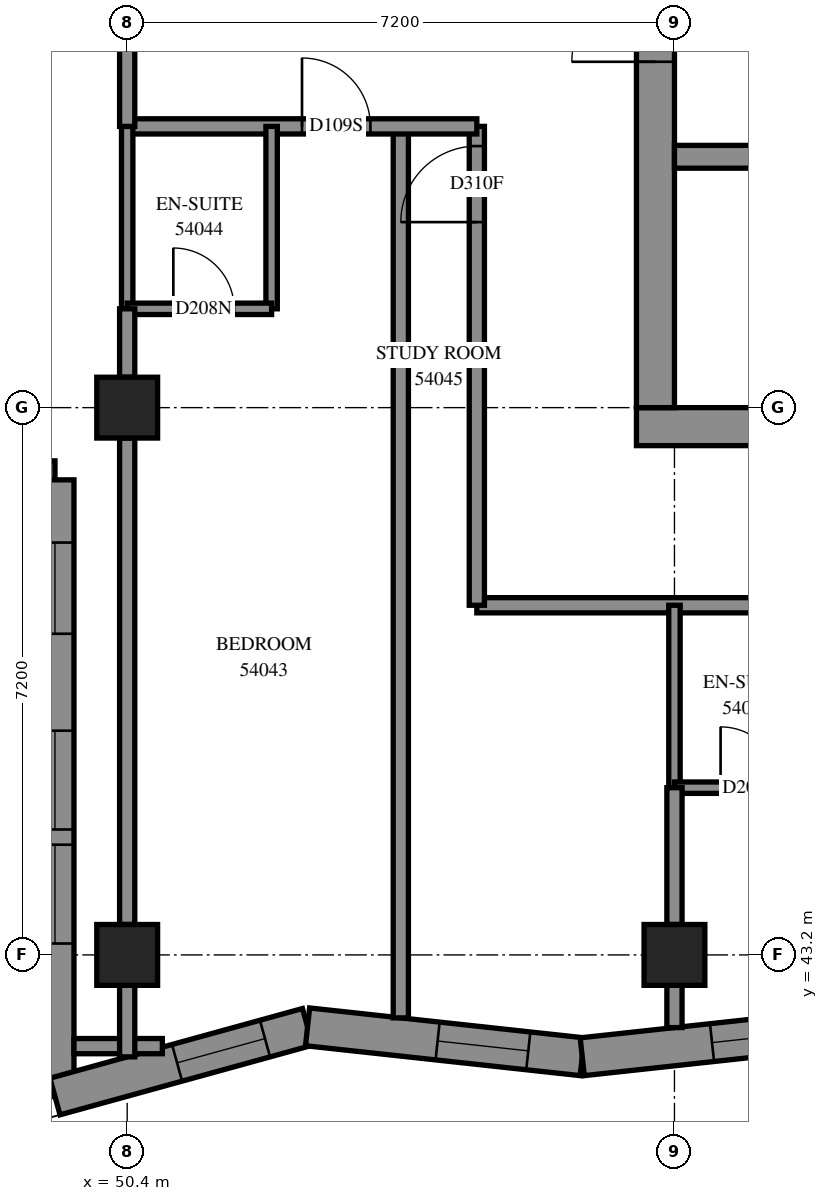
"""IFC4 building model, lengths in metres.
Left out: names, types, materials, properties, quantities, classifications, styles, units other than length and angle.
Written with IfcOpenShell. Run it as: python <this file> out.ifc"""

import sys

from ifc_helpers import new_model, si_unit, direction, frame, frame_2d, origin, origin_2d, place, context, subcontext, project, spatial, polyline, rectangle, outline, extrude, element, fill, save


model = new_model("IFC4")
c1 = context("Model", 3, precision=1e-05, world=origin(), true_north=direction((0.0, 1.0)))
c2 = subcontext(c1, "Body", "Model", "MODEL_VIEW")
j1 = project(units=[si_unit("LENGTHUNIT", "METRE"), si_unit("PLANEANGLEUNIT", "RADIAN")], contexts=[c1])
p1 = place(None, origin())
s1 = spatial("IfcSite", under=j1, at=p1, CompositionType="ELEMENT")
p2 = place(p1, origin())
s2 = spatial("IfcBuilding", under=s1, at=p2, CompositionType="ELEMENT")
p3 = place(p2, frame((0.0, 0.0, 199.8)))
s3 = spatial("IfcBuildingStorey", under=s2, at=p3, CompositionType="ELEMENT", Elevation=199.8)
for number, where, z_axis, x_axis in (
    (1, (50.4, 43.2, 0.0), (0.0, 0.0, 1.0), (1.0, 0.0, 0.0)),
    (2, (50.4, 50.4, 0.0), (0.0, 0.0, 1.0), (1.0, 0.0, 0.0)),
    (3, (57.6, 43.2, 0.0), (0.0, 0.0, 1.0), (1.0, 0.0, 0.0)),
):
    element("IfcColumn", number, at=place(p3, frame(where, z_axis=z_axis, x_axis=x_axis)), inside=s3, PredefinedType="COLUMN", context=c2, shape_type="SweptSolid", body=[
        extrude(rectangle(XDim=0.8, YDim=0.8, at=origin_2d()), origin(), (0.0, 0.0, 1.0), 3.1),
    ])
p4 = place(p3, frame((57.1, 50.15, -0.3), z_axis=(0.0, 0.0, 1.0), x_axis=(1.0, 0.0, 0.0)))
e4 = element("IfcWall", 4, at=p4, inside=s3, PredefinedType="SHEAR", context=c2, shape_type="SweptSolid", body=[
    extrude(rectangle(XDim=15.4, YDim=0.5, at=frame_2d((7.7, 0.0))), origin(), (0.0, 0.0, 1.0), 2.7),
])
p5 = place(p3, frame((57.35, 50.4, -0.3), z_axis=(0.0, 0.0, 1.0), x_axis=(0.0, 1.0, 0.0)))
e5 = element("IfcWall", 5, at=p5, inside=s3, PredefinedType="SHEAR", context=c2, shape_type="SweptSolid", body=[
    extrude(rectangle(XDim=14.4, YDim=0.5, at=frame_2d((7.2, 0.0))), origin(), (0.0, 0.0, 1.0), 2.7),
])
p6 = place(p5, frame((4.55, 0.0, 0.3)))
e6 = element("IfcOpeningElement", 6, at=p6, cuts=e5, PredefinedType="OPENING", context=c2, shape_type="SweptSolid", body=[
    extrude(rectangle(XDim=1.1, YDim=2.1, at=frame_2d((0.55, 1.05))), frame((0.0, 0.26, 0.0), z_axis=(0.0, -1.0, 0.0), x_axis=(1.0, 0.0, 0.0)), (0.0, 0.0, 1.0), 0.52),
])
p7 = place(p5, frame((11.35, 0.0, 0.3)))
e7 = element("IfcOpeningElement", 7, at=p7, cuts=e5, PredefinedType="OPENING", context=c2, shape_type="SweptSolid", body=[
    extrude(rectangle(XDim=1.1, YDim=2.1, at=frame_2d((0.55, 1.05))), frame((0.0, 0.26, 0.0), z_axis=(0.0, -1.0, 0.0), x_axis=(1.0, 0.0, 0.0)), (0.0, 0.0, 1.0), 0.52),
])
p8 = place(p3, frame((57.6, 53.7, 0.0), z_axis=(0.0, 0.0, 1.0), x_axis=(1.0, 0.0, 0.0)))
e8 = element("IfcWall", 8, at=p8, inside=s3, PredefinedType="SOLIDWALL", context=c2, shape_type="SweptSolid", body=[
    extrude(rectangle(XDim=14.4, YDim=0.3, at=frame_2d((7.2, 0.0))), origin(), (0.0, 0.0, 1.0), 3.1),
])
p9 = place(p8, frame((1.35, 0.0, 0.0)))
e9 = element("IfcOpeningElement", 9, at=p9, cuts=e8, PredefinedType="OPENING", context=c2, shape_type="SweptSolid", body=[
    extrude(rectangle(XDim=0.9, YDim=2.1, at=frame_2d((0.45, 1.05))), frame((0.0, 0.16, 0.0), z_axis=(0.0, -1.0, 0.0), x_axis=(1.0, 0.0, 0.0)), (0.0, 0.0, 1.0), 0.32),
])
p10 = place(p8, frame((4.95, 0.0, 0.0)))
e10 = element("IfcOpeningElement", 10, at=p10, cuts=e8, PredefinedType="OPENING", context=c2, shape_type="SweptSolid", body=[
    extrude(rectangle(XDim=0.9, YDim=2.1, at=frame_2d((0.45, 1.05))), frame((0.0, 0.16, 0.0), z_axis=(0.0, -1.0, 0.0), x_axis=(1.0, 0.0, 0.0)), (0.0, 0.0, 1.0), 0.32),
])
p11 = place(p8, frame((8.55, 0.0, 0.0)))
e11 = element("IfcOpeningElement", 11, at=p11, cuts=e8, PredefinedType="OPENING", context=c2, shape_type="SweptSolid", body=[
    extrude(rectangle(XDim=0.9, YDim=2.1, at=frame_2d((0.45, 1.05))), frame((0.0, 0.16, 0.0), z_axis=(0.0, -1.0, 0.0), x_axis=(1.0, 0.0, 0.0)), (0.0, 0.0, 1.0), 0.32),
])
p12 = place(p8, frame((12.05, 0.0, 0.0)))
e12 = element("IfcOpeningElement", 12, at=p12, cuts=e8, PredefinedType="OPENING", context=c2, shape_type="SweptSolid", body=[
    extrude(rectangle(XDim=1.1, YDim=2.1, at=frame_2d((0.55, 1.05))), frame((0.0, 0.16, 0.0), z_axis=(0.0, -1.0, 0.0), x_axis=(1.0, 0.0, 0.0)), (0.0, 0.0, 1.0), 0.32),
])
p13 = place(p3, frame((42.25, 49.45, 0.0), z_axis=(0.0, 0.0, 1.0), x_axis=(1.0, 0.0, 0.0)))
e13 = element("IfcWall", 13, at=p13, inside=s3, PredefinedType="SOLIDWALL", context=c2, shape_type="SweptSolid", body=[
    extrude(outline(polyline([(-0.25, -0.25), (6.95, -0.25), (7.45, 0.25), (0.25, 0.25), (-0.25, -0.25)])), origin(), (0.0, 0.0, 1.0), 3.1),
])
p14 = place(p13, frame((1.35, 0.0, 0.45)))
e14 = element("IfcOpeningElement", 14, at=p14, cuts=e13, PredefinedType="OPENING", context=c2, shape_type="SweptSolid", body=[
    extrude(rectangle(XDim=1.3, YDim=2.5, at=frame_2d((0.65, 1.25))), frame((0.0, 0.26, 0.0), z_axis=(0.0, -1.0, 0.0), x_axis=(1.0, 0.0, 0.0)), (0.0, 0.0, 1.0), 0.52),
])
p15 = place(p13, frame((2.85, 0.0, 0.45)))
e15 = element("IfcOpeningElement", 15, at=p15, cuts=e13, PredefinedType="OPENING", context=c2, shape_type="SweptSolid", body=[
    extrude(rectangle(XDim=1.3, YDim=2.5, at=frame_2d((0.65, 1.25))), frame((0.0, 0.26, 0.0), z_axis=(0.0, -1.0, 0.0), x_axis=(1.0, 0.0, 0.0)), (0.0, 0.0, 1.0), 0.52),
])
p16 = place(p13, frame((5.175, 0.0, 0.45)))
e16 = element("IfcOpeningElement", 16, at=p16, cuts=e13, PredefinedType="OPENING", context=c2, shape_type="SweptSolid", body=[
    extrude(rectangle(XDim=1.2, YDim=2.5, at=frame_2d((0.6, 1.25))), frame((0.0, 0.26, 0.0), z_axis=(0.0, -1.0, 0.0), x_axis=(1.0, 0.0, 0.0)), (0.0, 0.0, 1.0), 0.52),
])
p17 = place(p3, frame((49.45, 49.45, 0.0), z_axis=(0.0, 0.0, 1.0), x_axis=(0.0, -1.0, 0.0)))
e17 = element("IfcWall", 17, at=p17, inside=s3, PredefinedType="SOLIDWALL", context=c2, shape_type="SweptSolid", body=[
    extrude(outline(polyline([(0.25, -0.25), (8.441, -0.25), (7.784, 0.25), (-0.25, 0.25), (0.25, -0.25)])), origin(), (0.0, 0.0, 1.0), 3.1),
])
p18 = place(p17, frame((3.3, 0.0, 0.45)))
e18 = element("IfcOpeningElement", 18, at=p18, cuts=e17, PredefinedType="OPENING", context=c2, shape_type="SweptSolid", body=[
    extrude(rectangle(XDim=1.3, YDim=2.5, at=frame_2d((0.65, 1.25))), frame((0.0, 0.26, 0.0), z_axis=(0.0, -1.0, 0.0), x_axis=(1.0, 0.0, 0.0)), (0.0, 0.0, 1.0), 0.52),
])
p19 = place(p17, frame((4.8, 0.0, 0.45)))
e19 = element("IfcOpeningElement", 19, at=p19, cuts=e17, PredefinedType="OPENING", context=c2, shape_type="SweptSolid", body=[
    extrude(rectangle(XDim=1.3, YDim=2.5, at=frame_2d((0.65, 1.25))), frame((0.0, 0.26, 0.0), z_axis=(0.0, -1.0, 0.0), x_axis=(1.0, 0.0, 0.0)), (0.0, 0.0, 1.0), 0.52),
])
p20 = place(p17, frame((0.825, 0.0, 0.45)))
e20 = element("IfcOpeningElement", 20, at=p20, cuts=e17, PredefinedType="OPENING", context=c2, shape_type="SweptSolid", body=[
    extrude(rectangle(XDim=1.2, YDim=2.5, at=frame_2d((0.6, 1.25))), frame((0.0, 0.26, 0.0), z_axis=(0.0, -1.0, 0.0), x_axis=(1.0, 0.0, 0.0)), (0.0, 0.0, 1.0), 0.52),
])
p21 = place(p3, frame((49.45, 41.337, 0.0), z_axis=(0.0, 0.0, 1.0), x_axis=(0.964012106, 0.2658583448, 0.0)))
e21 = element("IfcWall", 21, at=p21, inside=s3, PredefinedType="SOLIDWALL", context=c2, shape_type="SweptSolid", body=[
    extrude(outline(polyline([(-0.328, -0.25), (3.399, -0.25), (3.495, 0.25), (0.328, 0.25), (-0.328, -0.25)])), origin(), (0.0, 0.0, 1.0), 3.1),
])
p22 = place(p21, frame((1.666, 0.0, 0.45)))
e22 = element("IfcOpeningElement", 22, at=p22, cuts=e21, PredefinedType="OPENING", context=c2, shape_type="SweptSolid", body=[
    extrude(rectangle(XDim=1.2, YDim=2.5, at=frame_2d((0.6, 1.25))), frame((0.0, 0.26, 0.0), z_axis=(0.0, -1.0, 0.0), x_axis=(1.0, 0.0, 0.0)), (0.0, 0.0, 1.0), 0.52),
])
p23 = place(p3, frame((52.773, 42.254, 0.0), z_axis=(0.0, 0.0, 1.0), x_axis=(0.9941327648, -0.1081667505, 0.0)))
e23 = element("IfcWall", 23, at=p23, inside=s3, PredefinedType="SOLIDWALL", context=c2, shape_type="SweptSolid", body=[
    extrude(outline(polyline([(0.048, -0.25), (3.662, -0.25), (3.608, 0.25), (-0.048, 0.25), (0.048, -0.25)])), origin(), (0.0, 0.0, 1.0), 3.1),
])
p24 = place(p23, frame((1.721, 0.0, 0.45)))
e24 = element("IfcOpeningElement", 24, at=p24, cuts=e23, PredefinedType="OPENING", context=c2, shape_type="SweptSolid", body=[
    extrude(rectangle(XDim=1.2, YDim=2.5, at=frame_2d((0.6, 1.25))), frame((0.0, 0.26, 0.0), z_axis=(0.0, -1.0, 0.0), x_axis=(1.0, 0.0, 0.0)), (0.0, 0.0, 1.0), 0.52),
])
p25 = place(p3, frame((56.387, 41.861, 0.0), z_axis=(0.0, 0.0, 1.0), x_axis=(0.994132181, 0.1081721163, 0.0)))
e25 = element("IfcWall", 25, at=p25, inside=s3, PredefinedType="SOLIDWALL", context=c2, shape_type="SweptSolid", body=[
    extrude(outline(polyline([(-0.027, -0.25), (3.587, -0.25), (3.642, 0.25), (0.027, 0.25), (-0.027, -0.25)])), origin(), (0.0, 0.0, 1.0), 3.1),
])
p26 = place(p25, frame((1.718, 0.0, 0.45)))
e26 = element("IfcOpeningElement", 26, at=p26, cuts=e25, PredefinedType="OPENING", context=c2, shape_type="SweptSolid", body=[
    extrude(rectangle(XDim=1.2, YDim=2.5, at=frame_2d((0.6, 1.25))), frame((0.0, 0.26, 0.0), z_axis=(0.0, -1.0, 0.0), x_axis=(1.0, 0.0, 0.0)), (0.0, 0.0, 1.0), 0.52),
])
p27 = place(p3, frame((55.0, 47.8, 0.0), z_axis=(0.0, 0.0, 1.0), x_axis=(1.0, 0.0, 0.0)))
e27 = element("IfcWall", 27, at=p27, inside=s3, PredefinedType="PARTITIONING", context=c2, shape_type="SweptSolid", body=[
    extrude(rectangle(XDim=19.266, YDim=0.2, at=frame_2d((9.633, 0.0))), origin(), (0.0, 0.0, 1.0), 3.1),
])
p28 = place(p27, frame((4.9, 0.0, 0.0)))
e28 = element("IfcOpeningElement", 28, at=p28, cuts=e27, PredefinedType="OPENING", context=c2, shape_type="SweptSolid", body=[
    extrude(rectangle(XDim=0.9, YDim=2.1, at=frame_2d((0.45, 1.05))), frame((0.0, 0.11, 0.0), z_axis=(0.0, -1.0, 0.0), x_axis=(1.0, 0.0, 0.0)), (0.0, 0.0, 1.0), 0.22),
])
p29 = place(p27, frame((6.6, 0.0, 0.0)))
e29 = element("IfcOpeningElement", 29, at=p29, cuts=e27, PredefinedType="OPENING", context=c2, shape_type="SweptSolid", body=[
    extrude(rectangle(XDim=0.9, YDim=2.1, at=frame_2d((0.45, 1.05))), frame((0.0, 0.11, 0.0), z_axis=(0.0, -1.0, 0.0), x_axis=(1.0, 0.0, 0.0)), (0.0, 0.0, 1.0), 0.22),
])
p30 = place(p27, frame((13.743, 0.0, 0.0)))
e30 = element("IfcOpeningElement", 30, at=p30, cuts=e27, PredefinedType="OPENING", context=c2, shape_type="SweptSolid", body=[
    extrude(rectangle(XDim=0.9, YDim=2.1, at=frame_2d((0.45, 1.05))), frame((0.0, 0.11, 0.0), z_axis=(0.0, -1.0, 0.0), x_axis=(1.0, 0.0, 0.0)), (0.0, 0.0, 1.0), 0.22),
])
p31 = place(p3, frame((54.0, 42.372, 0.0), z_axis=(0.0, 0.0, 1.0), x_axis=(0.0, 1.0, 0.0)))
e31 = element("IfcWall", 31, at=p31, inside=s3, PredefinedType="PARTITIONING", context=c2, shape_type="SweptSolid", body=[
    extrude(rectangle(XDim=11.728, YDim=0.2, at=frame_2d((5.864, 0.0))), origin(), (0.0, 0.0, 1.0), 3.1),
])
p32 = place(p3, frame((50.4, 43.6, 0.0), z_axis=(0.0, 0.0, 1.0), x_axis=(0.0, 1.0, 0.0)))
e32 = element("IfcWall", 32, at=p32, inside=s3, PredefinedType="PARTITIONING", context=c2, shape_type="SweptSolid", body=[
    extrude(rectangle(XDim=6.4, YDim=0.2, at=frame_2d((3.2, 0.0))), origin(), (0.0, 0.0, 1.0), 2.6),
])
p33 = place(p3, frame((55.0, 47.8, 0.0), z_axis=(0.0, 0.0, 1.0), x_axis=(0.0, 1.0, 0.0)))
e33 = element("IfcWall", 33, at=p33, inside=s3, PredefinedType="PARTITIONING", context=c2, shape_type="SweptSolid", body=[
    extrude(rectangle(XDim=6.3, YDim=0.2, at=frame_2d((3.15, 0.0))), origin(), (0.0, 0.0, 1.0), 3.1),
])
p34 = place(p33, frame((5.041, 0.0, 0.0)))
e34 = element("IfcOpeningElement", 34, at=p34, cuts=e33, PredefinedType="OPENING", context=c2, shape_type="SweptSolid", body=[
    extrude(rectangle(XDim=1.0, YDim=2.1, at=frame_2d((0.5, 1.05))), frame((0.0, 0.11, 0.0), z_axis=(0.0, -1.0, 0.0), x_axis=(1.0, 0.0, 0.0)), (0.0, 0.0, 1.0), 0.22),
])
p35 = place(p3, frame((50.4, 54.1, 0.0), z_axis=(0.0, 0.0, 1.0), x_axis=(1.0, 0.0, 0.0)))
e35 = element("IfcWall", 35, at=p35, inside=s3, PredefinedType="PARTITIONING", context=c2, shape_type="SweptSolid", body=[
    extrude(rectangle(XDim=4.6, YDim=0.2, at=frame_2d((2.3, 0.0))), origin(), (0.0, 0.0, 1.0), 3.1),
])
p36 = place(p35, frame((2.3, 0.0, 0.0)))
e36 = element("IfcOpeningElement", 36, at=p36, cuts=e35, PredefinedType="OPENING", context=c2, shape_type="SweptSolid", body=[
    extrude(rectangle(XDim=0.9, YDim=2.1, at=frame_2d((0.45, 1.05))), frame((0.0, 0.11, 0.0), z_axis=(0.0, -1.0, 0.0), x_axis=(1.0, 0.0, 0.0)), (0.0, 0.0, 1.0), 0.22),
])
for number, where, z_axis, x_axis in (
    (37, (52.3, 51.7, 0.0), (0.0, 0.0, 1.0), (0.0, 1.0, 0.0)),
    (38, (50.4, 51.7, 0.0), (0.0, 0.0, 1.0), (0.0, 1.0, 0.0)),
    (39, (57.6, 45.4, 0.0), (0.0, 0.0, 1.0), (0.0, 1.0, 0.0)),
):
    element("IfcWall", number, at=place(p3, frame(where, z_axis=z_axis, x_axis=x_axis)), inside=s3, PredefinedType="PARTITIONING", context=c2, shape_type="SweptSolid", body=[
        extrude(rectangle(XDim=2.4, YDim=0.15, at=frame_2d((1.2, 0.0))), origin(), (0.0, 0.0, 1.0), 3.1),
    ])
p37 = place(p3, frame((50.4, 54.1, 0.0), z_axis=(0.0, 0.0, 1.0), x_axis=(0.0, 1.0, 0.0)))
e40 = element("IfcWall", 40, at=p37, inside=s3, PredefinedType="PARTITIONING", context=c2, shape_type="SweptSolid", body=[
    extrude(rectangle(XDim=2.2, YDim=0.2, at=frame_2d((1.1, 0.0))), origin(), (0.0, 0.0, 1.0), 3.1),
])
p38 = place(p3, frame((50.4, 51.7, 0.0), z_axis=(0.0, 0.0, 1.0), x_axis=(1.0, 0.0, 0.0)))
e41 = element("IfcWall", 41, at=p38, inside=s3, PredefinedType="PARTITIONING", context=c2, shape_type="SweptSolid", body=[
    extrude(rectangle(XDim=1.9, YDim=0.15, at=frame_2d((0.95, 0.0))), origin(), (0.0, 0.0, 1.0), 3.1),
])
p39 = place(p38, frame((0.607, 0.0, 0.0)))
e42 = element("IfcOpeningElement", 42, at=p39, cuts=e41, PredefinedType="OPENING", context=c2, shape_type="SweptSolid", body=[
    extrude(rectangle(XDim=0.8, YDim=2.1, at=frame_2d((0.4, 1.05))), frame((0.0, 0.085, 0.0), z_axis=(0.0, -1.0, 0.0), x_axis=(1.0, 0.0, 0.0)), (0.0, 0.0, 1.0), 0.17),
])
p40 = place(p3, frame((57.6, 45.4, 0.0), z_axis=(0.0, 0.0, 1.0), x_axis=(1.0, 0.0, 0.0)))
e43 = element("IfcWall", 43, at=p40, inside=s3, PredefinedType="PARTITIONING", context=c2, shape_type="SweptSolid", body=[
    extrude(rectangle(XDim=1.9, YDim=0.15, at=frame_2d((0.95, 0.0))), origin(), (0.0, 0.0, 1.0), 3.1),
])
p41 = place(p40, frame((0.607, 0.0, 0.0)))
e44 = element("IfcOpeningElement", 44, at=p41, cuts=e43, PredefinedType="OPENING", context=c2, shape_type="SweptSolid", body=[
    extrude(rectangle(XDim=0.8, YDim=2.1, at=frame_2d((0.4, 1.05))), frame((0.0, 0.085, 0.0), z_axis=(0.0, -1.0, 0.0), x_axis=(1.0, 0.0, 0.0)), (0.0, 0.0, 1.0), 0.17),
])
p42 = place(p3, frame((57.6, 43.6, 0.0), z_axis=(0.0, 0.0, 1.0), x_axis=(0.0, 1.0, 0.0)))
e45 = element("IfcWall", 45, at=p42, inside=s3, PredefinedType="PARTITIONING", context=c2, shape_type="SweptSolid", body=[
    extrude(rectangle(XDim=1.8, YDim=0.2, at=frame_2d((0.9, 0.0))), origin(), (0.0, 0.0, 1.0), 3.1),
])
p43 = place(p3, frame((49.7, 42.0, 0.0), z_axis=(0.0, 0.0, 1.0), x_axis=(1.0, 0.0, 0.0)))
e46 = element("IfcWall", 46, at=p43, inside=s3, PredefinedType="PARTITIONING", context=c2, shape_type="SweptSolid", body=[
    extrude(rectangle(XDim=1.163, YDim=0.2, at=frame_2d((0.581, 0.0))), origin(), (0.0, 0.0, 1.0), 3.1),
])
p44 = place(p3, frame((50.4, 50.8, 0.0), z_axis=(0.0, 0.0, 1.0), x_axis=(0.0, 1.0, 0.0)))
e47 = element("IfcWall", 47, at=p44, inside=s3, PredefinedType="PARTITIONING", context=c2, shape_type="SweptSolid", body=[
    extrude(rectangle(XDim=0.9, YDim=0.2, at=frame_2d((0.45, 0.0))), origin(), (0.0, 0.0, 1.0), 3.1),
])
p45 = place(p3, frame((50.4, 41.859, 0.0), z_axis=(0.0, 0.0, 1.0), x_axis=(0.0, 1.0, 0.0)))
e48 = element("IfcWall", 48, at=p45, inside=s3, PredefinedType="PARTITIONING", context=c2, shape_type="SweptSolid", body=[
    extrude(rectangle(XDim=0.941, YDim=0.2, at=frame_2d((0.471, 0.0))), origin(), (0.0, 0.0, 1.0), 3.1),
])
p46 = place(p3, frame((57.6, 42.244, 0.0), z_axis=(0.0, 0.0, 1.0), x_axis=(0.0, 1.0, 0.0)))
e49 = element("IfcWall", 49, at=p46, inside=s3, PredefinedType="PARTITIONING", context=c2, shape_type="SweptSolid", body=[
    extrude(rectangle(XDim=0.556, YDim=0.2, at=frame_2d((0.278, 0.0))), origin(), (0.0, 0.0, 1.0), 3.1),
])
p47 = place(p18, origin())
e50 = element("IfcWindow", 50, at=p47, inside=s3, PartitioningType="SINGLE_PANEL", PredefinedType="WINDOW", context=c2, shape_type="SweptSolid", body=[
    extrude(rectangle(XDim=1.3, YDim=2.5, at=frame_2d((0.65, 1.25))), frame((0.0, 0.18, 0.0), z_axis=(0.0, -1.0, 0.0), x_axis=(1.0, 0.0, 0.0)), (0.0, 0.0, 1.0), 0.06),
])
fill(e18, e50)
p48 = place(p19, origin())
e51 = element("IfcWindow", 51, at=p48, inside=s3, PartitioningType="SINGLE_PANEL", PredefinedType="WINDOW", context=c2, shape_type="SweptSolid", body=[
    extrude(rectangle(XDim=1.3, YDim=2.5, at=frame_2d((0.65, 1.25))), frame((0.0, 0.18, 0.0), z_axis=(0.0, -1.0, 0.0), x_axis=(1.0, 0.0, 0.0)), (0.0, 0.0, 1.0), 0.06),
])
fill(e19, e51)
p49 = place(p20, origin())
e52 = element("IfcWindow", 52, at=p49, inside=s3, PartitioningType="SINGLE_PANEL", PredefinedType="WINDOW", context=c2, shape_type="SweptSolid", body=[
    extrude(rectangle(XDim=1.2, YDim=2.5, at=frame_2d((0.6, 1.25))), frame((0.0, 0.18, 0.0), z_axis=(0.0, -1.0, 0.0), x_axis=(1.0, 0.0, 0.0)), (0.0, 0.0, 1.0), 0.06),
])
fill(e20, e52)
p50 = place(p22, origin())
e53 = element("IfcWindow", 53, at=p50, inside=s3, PartitioningType="SINGLE_PANEL", PredefinedType="WINDOW", context=c2, shape_type="SweptSolid", body=[
    extrude(rectangle(XDim=1.2, YDim=2.5, at=frame_2d((0.6, 1.25))), frame((0.0, 0.18, 0.0), z_axis=(0.0, -1.0, 0.0), x_axis=(1.0, 0.0, 0.0)), (0.0, 0.0, 1.0), 0.06),
])
fill(e22, e53)
p51 = place(p24, origin())
e54 = element("IfcWindow", 54, at=p51, inside=s3, PartitioningType="SINGLE_PANEL", PredefinedType="WINDOW", context=c2, shape_type="SweptSolid", body=[
    extrude(rectangle(XDim=1.2, YDim=2.5, at=frame_2d((0.6, 1.25))), frame((0.0, 0.18, 0.0), z_axis=(0.0, -1.0, 0.0), x_axis=(1.0, 0.0, 0.0)), (0.0, 0.0, 1.0), 0.06),
])
fill(e24, e54)
p52 = place(p26, origin())
e55 = element("IfcWindow", 55, at=p52, inside=s3, PartitioningType="SINGLE_PANEL", PredefinedType="WINDOW", context=c2, shape_type="SweptSolid", body=[
    extrude(rectangle(XDim=1.2, YDim=2.5, at=frame_2d((0.6, 1.25))), frame((0.0, 0.18, 0.0), z_axis=(0.0, -1.0, 0.0), x_axis=(1.0, 0.0, 0.0)), (0.0, 0.0, 1.0), 0.06),
])
fill(e26, e55)
p53 = place(p6, origin())
e56 = element("IfcDoor", 56, at=p53, inside=s3, OperationType="DOUBLE_DOOR_SINGLE_SWING", PredefinedType="DOOR", context=c2, shape_type="SweptSolid", body=[
    extrude(rectangle(XDim=1.1, YDim=2.1, at=frame_2d((0.55, 1.05))), frame((0.0, 0.025, 0.0), z_axis=(0.0, -1.0, 0.0), x_axis=(1.0, 0.0, 0.0)), (0.0, 0.0, 1.0), 0.05),
])
fill(e6, e56)
p54 = place(p36, origin())
e57 = element("IfcDoor", 57, at=p54, inside=s3, OperationType="SINGLE_SWING_LEFT", PredefinedType="DOOR", context=c2, shape_type="SweptSolid", body=[
    extrude(rectangle(XDim=0.9, YDim=2.1, at=frame_2d((0.45, 1.05))), frame((0.0, 0.025, 0.0), z_axis=(0.0, -1.0, 0.0), x_axis=(1.0, 0.0, 0.0)), (0.0, 0.0, 1.0), 0.05),
])
fill(e36, e57)
p55 = place(p39, origin())
e58 = element("IfcDoor", 58, at=p55, inside=s3, OperationType="SINGLE_SWING_RIGHT", PredefinedType="DOOR", context=c2, shape_type="SweptSolid", body=[
    extrude(rectangle(XDim=0.8, YDim=2.1, at=frame_2d((0.4, 1.05))), frame((0.0, 0.025, 0.0), z_axis=(0.0, -1.0, 0.0), x_axis=(1.0, 0.0, 0.0)), (0.0, 0.0, 1.0), 0.05),
])
fill(e42, e58)
p56 = place(p34, origin())
e59 = element("IfcDoor", 59, at=p56, inside=s3, OperationType="SINGLE_SWING_RIGHT", PredefinedType="DOOR", context=c2, shape_type="SweptSolid", body=[
    extrude(rectangle(XDim=1.0, YDim=2.1, at=frame_2d((0.5, 1.05))), frame((0.0, 0.025, 0.0), z_axis=(0.0, -1.0, 0.0), x_axis=(1.0, 0.0, 0.0)), (0.0, 0.0, 1.0), 0.05),
])
fill(e34, e59)
p57 = place(p41, origin())
e60 = element("IfcDoor", 60, at=p57, inside=s3, OperationType="SINGLE_SWING_RIGHT", PredefinedType="DOOR", context=c2, shape_type="SweptSolid", body=[
    extrude(rectangle(XDim=0.8, YDim=2.1, at=frame_2d((0.4, 1.05))), frame((0.0, 0.025, 0.0), z_axis=(0.0, -1.0, 0.0), x_axis=(1.0, 0.0, 0.0)), (0.0, 0.0, 1.0), 0.05),
])
fill(e44, e60)
save(model, sys.argv[1])
